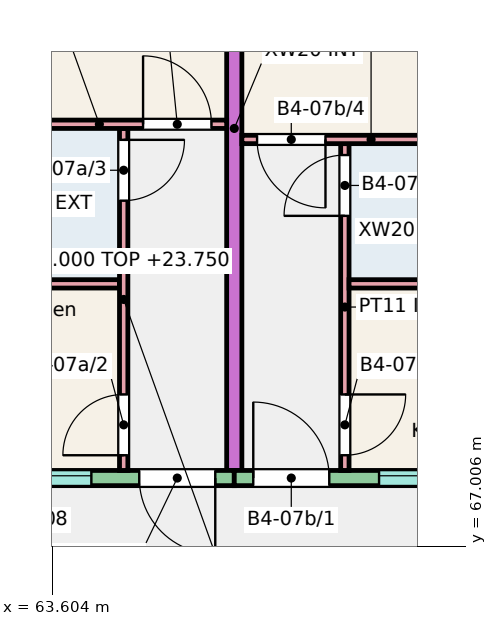
"""IFC4 building model, lengths in metres.
Left out: names, types, materials, properties, quantities, classifications, styles, units other than length and angle.
Written with IfcOpenShell. Run it as: python <this file> out.ifc"""

import sys

from ifc_helpers import new_model, si_unit, direction, frame, frame_2d, origin, place, context, subcontext, project, spatial, rectangle, extrude, element, fill, save


model = new_model("IFC4")
c1 = context("Model", 3, precision=1e-05, world=origin(), true_north=direction((0.0, 1.0)))
c2 = subcontext(c1, "Body", "Model", "MODEL_VIEW")
j1 = project(units=[si_unit("LENGTHUNIT", "METRE"), si_unit("PLANEANGLEUNIT", "RADIAN")], contexts=[c1])
p1 = place(None, origin())
s1 = spatial("IfcSite", under=j1, at=p1, CompositionType="ELEMENT")
p2 = place(p1, origin())
s2 = spatial("IfcBuilding", under=s1, at=p2, CompositionType="ELEMENT")
p3 = place(p2, frame((0.0, 0.0, 21.0)))
s3 = spatial("IfcBuildingStorey", under=s2, at=p3, CompositionType="ELEMENT", Elevation=21.0)
p4 = place(p3, frame((66.0, 68.0, 0.0), z_axis=(0.0, 0.0, 1.0), x_axis=(0.0, 1.0, 0.0)))
e1 = element("IfcWall", 1, at=p4, inside=s3, PredefinedType="SHEAR", context=c2, shape_type="SweptSolid", body=[
    extrude(rectangle(XDim=9.0, YDim=0.2, at=frame_2d((4.5, 0.0))), origin(), (0.0, 0.0, 1.0), 3.0),
])
p5 = place(p3, frame((62.55, 67.9, 0.0), z_axis=(0.0, 0.0, 1.0), x_axis=(1.0, 0.0, 0.0)))
e2 = element("IfcWall", 2, at=p5, inside=s3, PredefinedType="SOLIDWALL", context=c2, shape_type="SweptSolid", body=[
    extrude(rectangle(XDim=3.45, YDim=0.2, at=frame_2d((1.725, 0.0))), origin(), (0.0, 0.0, 1.0), 3.0),
])
p6 = place(p5, frame((0.37, 0.0, 1.1)))
e3 = element("IfcOpeningElement", 3, at=p6, cuts=e2, PredefinedType="OPENING", context=c2, shape_type="SweptSolid", body=[
    extrude(rectangle(XDim=1.2, YDim=1.3, at=frame_2d((0.6, 0.65))), frame((0.0, 0.11, 0.0), z_axis=(0.0, -1.0, 0.0), x_axis=(1.0, 0.0, 0.0)), (0.0, 0.0, 1.0), 0.22),
])
p7 = place(p5, frame((2.2, 0.0, 0.0)))
e4 = element("IfcOpeningElement", 4, at=p7, cuts=e2, PredefinedType="OPENING", context=c2, shape_type="SweptSolid", body=[
    extrude(rectangle(XDim=1.0, YDim=2.1, at=frame_2d((0.5, 1.05))), frame((0.0, 0.11, 0.0), z_axis=(0.0, -1.0, 0.0), x_axis=(1.0, 0.0, 0.0)), (0.0, 0.0, 1.0), 0.22),
])
p8 = place(p3, frame((66.0, 67.9, 0.0), z_axis=(0.0, 0.0, 1.0), x_axis=(1.0, 0.0, 0.0)))
e5 = element("IfcWall", 5, at=p8, inside=s3, PredefinedType="SOLIDWALL", context=c2, shape_type="SweptSolid", body=[
    extrude(rectangle(XDim=3.6, YDim=0.2, at=frame_2d((1.8, 0.0))), origin(), (0.0, 0.0, 1.0), 3.0),
])
p9 = place(p8, frame((1.905, 0.0, 1.1)))
e6 = element("IfcOpeningElement", 6, at=p9, cuts=e5, PredefinedType="OPENING", context=c2, shape_type="SweptSolid", body=[
    extrude(rectangle(XDim=1.2, YDim=1.3, at=frame_2d((0.6, 0.65))), frame((0.0, 0.11, 0.0), z_axis=(0.0, -1.0, 0.0), x_axis=(1.0, 0.0, 0.0)), (0.0, 0.0, 1.0), 0.22),
])
p10 = place(p8, frame((0.25, 0.0, 0.0)))
e7 = element("IfcOpeningElement", 7, at=p10, cuts=e5, PredefinedType="OPENING", context=c2, shape_type="SweptSolid", body=[
    extrude(rectangle(XDim=1.0, YDim=2.1, at=frame_2d((0.5, 1.05))), frame((0.0, 0.11, 0.0), z_axis=(0.0, -1.0, 0.0), x_axis=(1.0, 0.0, 0.0)), (0.0, 0.0, 1.0), 0.22),
])
p11 = place(p3, frame((62.55, 70.455, 0.0), z_axis=(0.0, 0.0, 1.0), x_axis=(1.0, 0.0, 0.0)))
e8 = element("IfcWall", 8, at=p11, inside=s3, PredefinedType="PARTITIONING", context=c2, shape_type="SweptSolid", body=[
    extrude(rectangle(XDim=1.94, YDim=0.11, at=frame_2d((0.97, 0.0))), origin(), (0.0, 0.0, 1.0), 2.75),
])
p12 = place(p3, frame((64.545, 68.0, 0.0), z_axis=(0.0, 0.0, 1.0), x_axis=(0.0, 1.0, 0.0)))
e9 = element("IfcWall", 9, at=p12, inside=s3, PredefinedType="PARTITIONING", context=c2, shape_type="SweptSolid", body=[
    extrude(rectangle(XDim=4.5, YDim=0.11, at=frame_2d((2.25, 0.0))), origin(), (0.0, 0.0, 1.0), 2.75),
])
p13 = place(p12, frame((0.2, 0.0, 0.0)))
e10 = element("IfcOpeningElement", 10, at=p13, cuts=e9, PredefinedType="OPENING", context=c2, shape_type="SweptSolid", body=[
    extrude(rectangle(XDim=0.8, YDim=2.1, at=frame_2d((0.4, 1.05))), frame((0.0, 0.065, 0.0), z_axis=(0.0, -1.0, 0.0), x_axis=(1.0, 0.0, 0.0)), (0.0, 0.0, 1.0), 0.13),
])
p14 = place(p12, frame((3.55, 0.0, 0.0)))
e11 = element("IfcOpeningElement", 11, at=p14, cuts=e9, PredefinedType="OPENING", context=c2, shape_type="SweptSolid", body=[
    extrude(rectangle(XDim=0.8, YDim=2.1, at=frame_2d((0.4, 1.05))), frame((0.0, 0.065, 0.0), z_axis=(0.0, -1.0, 0.0), x_axis=(1.0, 0.0, 0.0)), (0.0, 0.0, 1.0), 0.13),
])
p15 = place(p3, frame((62.55, 72.555, 0.0), z_axis=(0.0, 0.0, 1.0), x_axis=(1.0, 0.0, 0.0)))
e12 = element("IfcWall", 12, at=p15, inside=s3, PredefinedType="PARTITIONING", context=c2, shape_type="SweptSolid", body=[
    extrude(rectangle(XDim=3.35, YDim=0.11, at=frame_2d((1.675, 0.0))), origin(), (0.0, 0.0, 1.0), 2.75),
])
p16 = place(p15, frame((2.25, 0.0, 0.0)))
e13 = element("IfcOpeningElement", 13, at=p16, cuts=e12, PredefinedType="OPENING", context=c2, shape_type="SweptSolid", body=[
    extrude(rectangle(XDim=0.9, YDim=2.1, at=frame_2d((0.45, 1.05))), frame((0.0, 0.065, 0.0), z_axis=(0.0, -1.0, 0.0), x_axis=(1.0, 0.0, 0.0)), (0.0, 0.0, 1.0), 0.13),
])
p17 = place(p3, frame((67.455, 68.0, 0.0), z_axis=(0.0, 0.0, 1.0), x_axis=(0.0, 1.0, 0.0)))
e14 = element("IfcWall", 14, at=p17, inside=s3, PredefinedType="PARTITIONING", context=c2, shape_type="SweptSolid", body=[
    extrude(rectangle(XDim=4.3, YDim=0.11, at=frame_2d((2.15, 0.0))), origin(), (0.0, 0.0, 1.0), 2.8),
])
p18 = place(p17, frame((0.2, 0.0, 0.0)))
e15 = element("IfcOpeningElement", 15, at=p18, cuts=e14, PredefinedType="OPENING", context=c2, shape_type="SweptSolid", body=[
    extrude(rectangle(XDim=0.8, YDim=2.1, at=frame_2d((0.4, 1.05))), frame((0.0, 0.065, 0.0), z_axis=(0.0, -1.0, 0.0), x_axis=(1.0, 0.0, 0.0)), (0.0, 0.0, 1.0), 0.13),
])
p19 = place(p17, frame((3.35, 0.0, 0.0)))
e16 = element("IfcOpeningElement", 16, at=p19, cuts=e14, PredefinedType="OPENING", context=c2, shape_type="SweptSolid", body=[
    extrude(rectangle(XDim=0.8, YDim=2.1, at=frame_2d((0.4, 1.05))), frame((0.0, 0.065, 0.0), z_axis=(0.0, -1.0, 0.0), x_axis=(1.0, 0.0, 0.0)), (0.0, 0.0, 1.0), 0.13),
])
p20 = place(p3, frame((67.51, 70.455, 0.0), z_axis=(0.0, 0.0, 1.0), x_axis=(1.0, 0.0, 0.0)))
e17 = element("IfcWall", 17, at=p20, inside=s3, PredefinedType="PARTITIONING", context=c2, shape_type="SweptSolid", body=[
    extrude(rectangle(XDim=1.99, YDim=0.11, at=frame_2d((0.995, 0.0))), origin(), (0.0, 0.0, 1.0), 2.8),
])
p21 = place(p3, frame((66.1, 72.355, 0.0), z_axis=(0.0, 0.0, 1.0), x_axis=(1.0, 0.0, 0.0)))
e18 = element("IfcWall", 18, at=p21, inside=s3, PredefinedType="PARTITIONING", context=c2, shape_type="SweptSolid", body=[
    extrude(rectangle(XDim=3.4, YDim=0.11, at=frame_2d((1.7, 0.0))), origin(), (0.0, 0.0, 1.0), 2.8),
])
p22 = place(p21, frame((0.2, 0.0, 0.0)))
e19 = element("IfcOpeningElement", 19, at=p22, cuts=e18, PredefinedType="OPENING", context=c2, shape_type="SweptSolid", body=[
    extrude(rectangle(XDim=0.9, YDim=2.1, at=frame_2d((0.45, 1.05))), frame((0.0, 0.065, 0.0), z_axis=(0.0, -1.0, 0.0), x_axis=(1.0, 0.0, 0.0)), (0.0, 0.0, 1.0), 0.13),
])
p23 = place(p6, origin())
e20 = element("IfcWindow", 20, at=p23, inside=s3, PartitioningType="SINGLE_PANEL", PredefinedType="WINDOW", context=c2, shape_type="SweptSolid", body=[
    extrude(rectangle(XDim=1.2, YDim=1.3, at=frame_2d((0.6, 0.65))), frame((0.0, 0.06, 0.0), z_axis=(0.0, -1.0, 0.0), x_axis=(1.0, 0.0, 0.0)), (0.0, 0.0, 1.0), 0.06),
])
fill(e3, e20)
p24 = place(p9, origin())
e21 = element("IfcWindow", 21, at=p24, inside=s3, PartitioningType="SINGLE_PANEL", PredefinedType="WINDOW", context=c2, shape_type="SweptSolid", body=[
    extrude(rectangle(XDim=1.2, YDim=1.3, at=frame_2d((0.6, 0.65))), frame((0.0, 0.06, 0.0), z_axis=(0.0, -1.0, 0.0), x_axis=(1.0, 0.0, 0.0)), (0.0, 0.0, 1.0), 0.06),
])
fill(e6, e21)
p25 = place(p7, origin())
e22 = element("IfcDoor", 22, at=p25, inside=s3, OperationType="SINGLE_SWING_RIGHT", PredefinedType="DOOR", context=c2, shape_type="SweptSolid", body=[
    extrude(rectangle(XDim=1.0, YDim=2.1, at=frame_2d((0.5, 1.05))), frame((0.0, 0.025, 0.0), z_axis=(0.0, -1.0, 0.0), x_axis=(1.0, 0.0, 0.0)), (0.0, 0.0, 1.0), 0.05),
])
fill(e4, e22)
p26 = place(p13, origin())
e23 = element("IfcDoor", 23, at=p26, inside=s3, OperationType="SINGLE_SWING_LEFT", PredefinedType="DOOR", context=c2, shape_type="SweptSolid", body=[
    extrude(rectangle(XDim=0.8, YDim=2.1, at=frame_2d((0.4, 1.05))), frame((0.0, 0.025, 0.0), z_axis=(0.0, -1.0, 0.0), x_axis=(1.0, 0.0, 0.0)), (0.0, 0.0, 1.0), 0.05),
])
fill(e10, e23)
p27 = place(p14, origin())
e24 = element("IfcDoor", 24, at=p27, inside=s3, OperationType="SINGLE_SWING_RIGHT", PredefinedType="DOOR", context=c2, shape_type="SweptSolid", body=[
    extrude(rectangle(XDim=0.8, YDim=2.1, at=frame_2d((0.4, 1.05))), frame((0.0, 0.025, 0.0), z_axis=(0.0, -1.0, 0.0), x_axis=(1.0, 0.0, 0.0)), (0.0, 0.0, 1.0), 0.05),
])
fill(e11, e24)
p28 = place(p16, origin())
e25 = element("IfcDoor", 25, at=p28, inside=s3, OperationType="SINGLE_SWING_LEFT", PredefinedType="DOOR", context=c2, shape_type="SweptSolid", body=[
    extrude(rectangle(XDim=0.9, YDim=2.1, at=frame_2d((0.45, 1.05))), frame((0.0, 0.025, 0.0), z_axis=(0.0, -1.0, 0.0), x_axis=(1.0, 0.0, 0.0)), (0.0, 0.0, 1.0), 0.05),
])
fill(e13, e25)
p29 = place(p10, origin())
e26 = element("IfcDoor", 26, at=p29, inside=s3, OperationType="SINGLE_SWING_LEFT", PredefinedType="DOOR", context=c2, shape_type="SweptSolid", body=[
    extrude(rectangle(XDim=1.0, YDim=2.1, at=frame_2d((0.5, 1.05))), frame((0.0, 0.025, 0.0), z_axis=(0.0, -1.0, 0.0), x_axis=(1.0, 0.0, 0.0)), (0.0, 0.0, 1.0), 0.05),
])
fill(e7, e26)
p30 = place(p18, origin())
e27 = element("IfcDoor", 27, at=p30, inside=s3, OperationType="SINGLE_SWING_RIGHT", PredefinedType="DOOR", context=c2, shape_type="SweptSolid", body=[
    extrude(rectangle(XDim=0.8, YDim=2.1, at=frame_2d((0.4, 1.05))), frame((0.0, 0.025, 0.0), z_axis=(0.0, -1.0, 0.0), x_axis=(1.0, 0.0, 0.0)), (0.0, 0.0, 1.0), 0.05),
])
fill(e15, e27)
p31 = place(p19, origin())
e28 = element("IfcDoor", 28, at=p31, inside=s3, OperationType="SINGLE_SWING_LEFT", PredefinedType="DOOR", context=c2, shape_type="SweptSolid", body=[
    extrude(rectangle(XDim=0.8, YDim=2.1, at=frame_2d((0.4, 1.05))), frame((0.0, 0.025, 0.0), z_axis=(0.0, -1.0, 0.0), x_axis=(1.0, 0.0, 0.0)), (0.0, 0.0, 1.0), 0.05),
])
fill(e16, e28)
p32 = place(p22, origin())
e29 = element("IfcDoor", 29, at=p32, inside=s3, OperationType="SINGLE_SWING_RIGHT", PredefinedType="DOOR", context=c2, shape_type="SweptSolid", body=[
    extrude(rectangle(XDim=0.9, YDim=2.1, at=frame_2d((0.45, 1.05))), frame((0.0, 0.025, 0.0), z_axis=(0.0, -1.0, 0.0), x_axis=(1.0, 0.0, 0.0)), (0.0, 0.0, 1.0), 0.05),
])
fill(e19, e29)
save(model, sys.argv[1])
